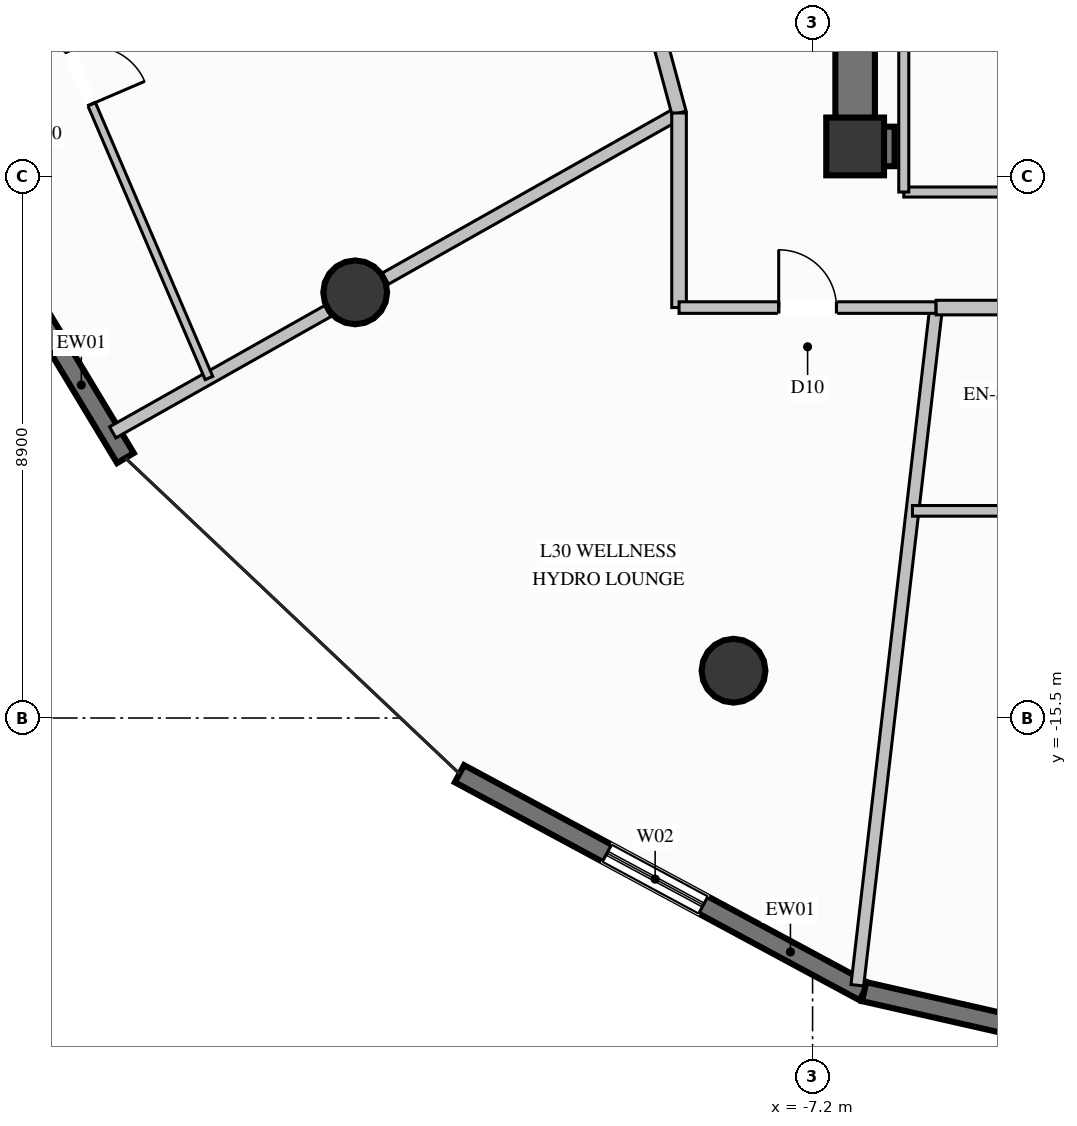
"""IFC4 building model, lengths in metres.
Left out: names, types, materials, properties, quantities, classifications, styles, units other than length and angle.
Written with IfcOpenShell. Run it as: python <this file> out.ifc"""

import sys

from ifc_helpers import new_model, si_unit, direction, frame, frame_2d, origin, origin_2d, place, context, subcontext, project, spatial, rectangle, circle, extrude, element, fill, save


model = new_model("IFC4")
c1 = context("Model", 3, precision=1e-05, world=origin(), true_north=direction((0.0, 1.0)))
c2 = subcontext(c1, "Body", "Model", "MODEL_VIEW")
j1 = project(units=[si_unit("LENGTHUNIT", "METRE"), si_unit("PLANEANGLEUNIT", "RADIAN")], contexts=[c1])
p1 = place(None, origin())
s1 = spatial("IfcSite", under=j1, at=p1, CompositionType="ELEMENT")
p2 = place(p1, origin())
s2 = spatial("IfcBuilding", under=s1, at=p2, CompositionType="ELEMENT")
p3 = place(p2, frame((0.0, 0.0, 120.6)))
s3 = spatial("IfcBuildingStorey", under=s2, at=p3, CompositionType="ELEMENT", Elevation=120.6)
p4 = place(p3, frame((-6.5, -6.1, 0.0), z_axis=(0.0, 0.0, 1.0), x_axis=(1.0, 0.0, 0.0)))
e1 = element("IfcColumn", 1, at=p4, inside=s3, PredefinedType="COLUMN", context=c2, shape_type="SweptSolid", body=[
    extrude(rectangle(XDim=0.95, YDim=0.95, at=origin_2d()), origin(), (0.0, 0.0, 1.0), 3.6),
])
p5 = place(p3, frame((-6.175, -6.1, 0.0), z_axis=(0.0, 0.0, 1.0), x_axis=(1.0, 0.0, 0.0)))
e2 = element("IfcWall", 2, at=p5, inside=s3, PredefinedType="SHEAR", context=c2, shape_type="SweptSolid", body=[
    extrude(rectangle(XDim=0.325, YDim=0.65, at=frame_2d((0.163, 0.0))), origin(), (0.0, 0.0, 1.0), 3.6),
])
p6 = place(p3, frame((-6.5, -6.425, 0.0), z_axis=(0.0, 0.0, 1.0), x_axis=(0.0, 1.0, 0.0)))
e3 = element("IfcWall", 3, at=p6, inside=s3, PredefinedType="SHEAR", context=c2, shape_type="SweptSolid", body=[
    extrude(rectangle(XDim=3.075, YDim=0.65, at=frame_2d((1.538, 0.0))), origin(), (0.0, 0.0, 1.0), 3.6),
])
for number, where, z_axis, x_axis in (
    (4, (-14.722, -8.5, 0.0), (0.0, 0.0, 1.0), (1.0, 0.0, 0.0)),
    (5, (-8.5, -14.722, 0.0), (0.0, 0.0, 1.0), (1.0, 0.0, 0.0)),
):
    element("IfcColumn", number, at=place(p3, frame(where, z_axis=z_axis, x_axis=x_axis)), inside=s3, PredefinedType="COLUMN", context=c2, shape_type="SweptSolid", body=[
        extrude(circle(Radius=0.525, at=origin_2d()), origin(), (0.0, 0.0, 1.0), 3.6),
    ])
p7 = place(p3, frame((-18.501, -11.225, 0.0), z_axis=(0.0, 0.0, 1.0), x_axis=(-0.516707807554, 0.856161808079, 0.0)))
e6 = element("IfcWall", 6, at=p7, inside=s3, PredefinedType="SOLIDWALL", context=c2, shape_type="SweptSolid", body=[
    extrude(rectangle(XDim=7.347, YDim=0.32, at=frame_2d((3.673, 0.0))), origin(), (0.0, 0.0, 1.0), 3.35),
])
p8 = place(p7, frame((3.058, 0.0, 0.35)))
e7 = element("IfcOpeningElement", 7, at=p8, cuts=e6, PredefinedType="OPENING", context=c2, shape_type="SweptSolid", body=[
    extrude(rectangle(XDim=1.8, YDim=2.6, at=frame_2d((0.9, 1.3))), frame((0.0, 0.17, 0.0), z_axis=(0.0, -1.0, 0.0), x_axis=(1.0, 0.0, 0.0)), (0.0, 0.0, 1.0), 0.34),
])
p9 = place(p3, frame((-6.352, -20.0, 0.0), z_axis=(0.0, 0.0, 1.0), x_axis=(-0.880443095894, 0.474151826836, 0.0)))
e8 = element("IfcWall", 8, at=p9, inside=s3, PredefinedType="SOLIDWALL", context=c2, shape_type="SweptSolid", body=[
    extrude(rectangle(XDim=7.559, YDim=0.32, at=frame_2d((3.779, 0.0))), origin(), (0.0, 0.0, 1.0), 3.35),
])
p10 = place(p9, frame((3.004, 0.0, 0.35)))
e9 = element("IfcOpeningElement", 9, at=p10, cuts=e8, PredefinedType="OPENING", context=c2, shape_type="SweptSolid", body=[
    extrude(rectangle(XDim=1.8, YDim=2.6, at=frame_2d((0.9, 1.3))), frame((0.0, 0.17, 0.0), z_axis=(0.0, -1.0, 0.0), x_axis=(1.0, 0.0, 0.0)), (0.0, 0.0, 1.0), 0.34),
])
p11 = place(p3, frame((0.813, -21.627, 0.0), z_axis=(0.0, 0.0, 1.0), x_axis=(-0.975175922812, 0.22143152343, 0.0)))
e10 = element("IfcWall", 10, at=p11, inside=s3, PredefinedType="SOLIDWALL", context=c2, shape_type="SweptSolid", body=[
    extrude(rectangle(XDim=7.347, YDim=0.32, at=frame_2d((3.674, 0.0))), origin(), (0.0, 0.0, 1.0), 3.35),
])
p12 = place(p11, frame((2.774, 0.0, 0.35)))
e11 = element("IfcOpeningElement", 11, at=p12, cuts=e10, PredefinedType="OPENING", context=c2, shape_type="SweptSolid", body=[
    extrude(rectangle(XDim=1.8, YDim=2.6, at=frame_2d((0.9, 1.3))), frame((0.0, 0.17, 0.0), z_axis=(0.0, -1.0, 0.0), x_axis=(1.0, 0.0, 0.0)), (0.0, 0.0, 1.0), 0.34),
])
p13 = place(p3, frame((-5.7, -6.85, 0.0), z_axis=(0.0, 0.0, 1.0), x_axis=(1.0, 0.0, 0.0)))
e12 = element("IfcWall", 12, at=p13, inside=s3, PredefinedType="PARTITIONING", context=c2, shape_type="SweptSolid", body=[
    extrude(rectangle(XDim=4.35, YDim=0.165, at=frame_2d((2.175, 0.0))), origin(), (0.0, 0.0, 1.0), 2.435),
])
p14 = place(p13, frame((1.7, 0.0, 0.0)))
e13 = element("IfcOpeningElement", 13, at=p14, cuts=e12, PredefinedType="OPENING", context=c2, shape_type="SweptSolid", body=[
    extrude(rectangle(XDim=0.95, YDim=2.1, at=frame_2d((0.475, 1.05))), frame((0.0, 0.093, 0.0), z_axis=(0.0, -1.0, 0.0), x_axis=(1.0, 0.0, 0.0)), (0.0, 0.0, 1.0), 0.185),
])
p15 = place(p3, frame((-5.7, -3.5, 0.0), z_axis=(0.0, 0.0, 1.0), x_axis=(0.0, -1.0, 0.0)))
e14 = element("IfcWall", 14, at=p15, inside=s3, PredefinedType="PARTITIONING", context=c2, shape_type="SweptSolid", body=[
    extrude(rectangle(XDim=3.35, YDim=0.165, at=frame_2d((1.675, 0.0))), origin(), (0.0, 0.0, 1.0), 2.435),
])
p16 = place(p3, frame((-9.396, -5.55, 0.0), z_axis=(0.0, 0.0, 1.0), x_axis=(-0.871038847926, -0.491214133962, 0.0)))
e15 = element("IfcWall", 15, at=p16, inside=s3, PredefinedType="PARTITIONING", context=c2, shape_type="SweptSolid", body=[
    extrude(rectangle(XDim=5.545, YDim=0.21, at=frame_2d((2.772, 0.0))), origin(), (0.0, 0.0, 1.0), 2.719),
])
p17 = place(p3, frame((-15.172, -8.807, 0.0), z_axis=(0.0, 0.0, 1.0), x_axis=(-0.871040458587, -0.491211277867, 0.0)))
e16 = element("IfcWall", 16, at=p17, inside=s3, PredefinedType="PARTITIONING", context=c2, shape_type="SweptSolid", body=[
    extrude(rectangle(XDim=4.062, YDim=0.21, at=frame_2d((2.031, 0.0))), origin(), (0.0, 0.0, 1.0), 3.35),
])
p18 = place(p3, frame((-10.85, -0.15, 0.0), z_axis=(0.0, 0.0, 1.0), x_axis=(0.260009481157, -0.965606063417, 0.0)))
e17 = element("IfcWall", 17, at=p18, inside=s3, PredefinedType="PARTITIONING", context=c2, shape_type="SweptSolid", body=[
    extrude(rectangle(XDim=5.593, YDim=0.24, at=frame_2d((2.796, 0.0))), origin(), (0.0, 0.0, 1.0), 3.35),
])
p19 = place(p3, frame((-21.362, -0.026, 0.0), z_axis=(0.0, 0.0, 1.0), x_axis=(0.39388093293, -0.919161471491, 0.0)))
e18 = element("IfcWall", 18, at=p19, inside=s3, PredefinedType="PARTITIONING", context=c2, shape_type="SweptSolid", body=[
    extrude(rectangle(XDim=10.752, YDim=0.135, at=frame_2d((5.376, 0.0))), origin(), (0.0, 0.0, 1.0), 3.35),
])
p20 = place(p19, frame((4.901, 0.0, 0.0)))
e19 = element("IfcOpeningElement", 19, at=p20, cuts=e18, PredefinedType="OPENING", context=c2, shape_type="SweptSolid", body=[
    extrude(rectangle(XDim=0.95, YDim=2.1, at=frame_2d((0.475, 1.05))), frame((0.0, 0.078, 0.0), z_axis=(0.0, -1.0, 0.0), x_axis=(1.0, 0.0, 0.0)), (0.0, 0.0, 1.0), 0.155),
])
p21 = place(p3, frame((-5.168, -8.75, 0.0), z_axis=(0.0, 0.0, 1.0), x_axis=(-0.115519331372, -0.993305232081, 0.0)))
e20 = element("IfcWall", 20, at=p21, inside=s3, PredefinedType="PARTITIONING", context=c2, shape_type="SweptSolid", body=[
    extrude(rectangle(XDim=11.22, YDim=0.21, at=frame_2d((5.61, 0.0))), origin(), (0.0, 0.0, 1.0), 3.35),
])
p22 = place(p3, frame((-9.396, -5.55, 0.0), z_axis=(0.0, 0.0, 1.0), x_axis=(0.0, -1.0, 0.0)))
e21 = element("IfcWall", 21, at=p22, inside=s3, PredefinedType="PARTITIONING", context=c2, shape_type="SweptSolid", body=[
    extrude(rectangle(XDim=3.2, YDim=0.24, at=frame_2d((1.6, 0.0))), origin(), (0.0, 0.0, 1.0), 3.35),
])
p23 = place(p3, frame((-9.396, -8.75, 0.0), z_axis=(0.0, 0.0, 1.0), x_axis=(1.0, 0.0, 0.0)))
e22 = element("IfcWall", 22, at=p23, inside=s3, PredefinedType="PARTITIONING", context=c2, shape_type="SweptSolid", body=[
    extrude(rectangle(XDim=4.228, YDim=0.19, at=frame_2d((2.114, 0.0))), origin(), (0.0, 0.0, 1.0), 3.35),
])
p24 = place(p23, frame((1.639, 0.0, 0.0)))
e23 = element("IfcOpeningElement", 23, at=p24, cuts=e22, PredefinedType="OPENING", context=c2, shape_type="SweptSolid", body=[
    extrude(rectangle(XDim=0.95, YDim=2.1, at=frame_2d((0.475, 1.05))), frame((0.0, 0.105, 0.0), z_axis=(0.0, -1.0, 0.0), x_axis=(1.0, 0.0, 0.0)), (0.0, 0.0, 1.0), 0.21),
])
p25 = place(p3, frame((-5.168, -8.75, 0.0), z_axis=(0.0, 0.0, 1.0), x_axis=(1.0, 0.0, 0.0)))
e24 = element("IfcWall", 24, at=p25, inside=s3, PredefinedType="PARTITIONING", context=c2, shape_type="SweptSolid", body=[
    extrude(rectangle(XDim=5.168, YDim=0.24, at=frame_2d((2.584, 0.0))), origin(), (0.0, 0.0, 1.0), 3.35),
])
p26 = place(p3, frame((-5.557, -12.093, 0.0), z_axis=(0.0, 0.0, 1.0), x_axis=(1.0, 0.0, 0.0)))
e25 = element("IfcWall", 25, at=p26, inside=s3, PredefinedType="PLUMBINGWALL", context=c2, shape_type="SweptSolid", body=[
    extrude(rectangle(XDim=5.557, YDim=0.175, at=frame_2d((2.778, 0.0))), origin(), (0.0, 0.0, 1.0), 3.35),
])
p27 = place(p10, origin())
e26 = element("IfcWindow", 26, at=p27, inside=s3, PartitioningType="SINGLE_PANEL", PredefinedType="WINDOW", context=c2, shape_type="SweptSolid", body=[
    extrude(rectangle(XDim=1.8, YDim=2.6, at=frame_2d((0.9, 1.3))), frame((0.0, 0.03, 0.0), z_axis=(0.0, -1.0, 0.0), x_axis=(1.0, 0.0, 0.0)), (0.0, 0.0, 1.0), 0.06),
])
fill(e9, e26)
p28 = place(p20, origin())
e27 = element("IfcDoor", 27, at=p28, inside=s3, OperationType="SINGLE_SWING_RIGHT", PredefinedType="DOOR", context=c2, shape_type="SweptSolid", body=[
    extrude(rectangle(XDim=0.95, YDim=2.1, at=frame_2d((0.475, 1.05))), frame((0.0, 0.025, 0.0), z_axis=(0.0, -1.0, 0.0), x_axis=(1.0, 0.0, 0.0)), (0.0, 0.0, 1.0), 0.05),
])
fill(e19, e27)
p29 = place(p24, origin())
e28 = element("IfcDoor", 28, at=p29, inside=s3, OperationType="SINGLE_SWING_LEFT", PredefinedType="DOOR", context=c2, shape_type="SweptSolid", body=[
    extrude(rectangle(XDim=0.95, YDim=2.1, at=frame_2d((0.475, 1.05))), frame((0.0, 0.025, 0.0), z_axis=(0.0, -1.0, 0.0), x_axis=(1.0, 0.0, 0.0)), (0.0, 0.0, 1.0), 0.05),
])
fill(e23, e28)
save(model, sys.argv[1])
